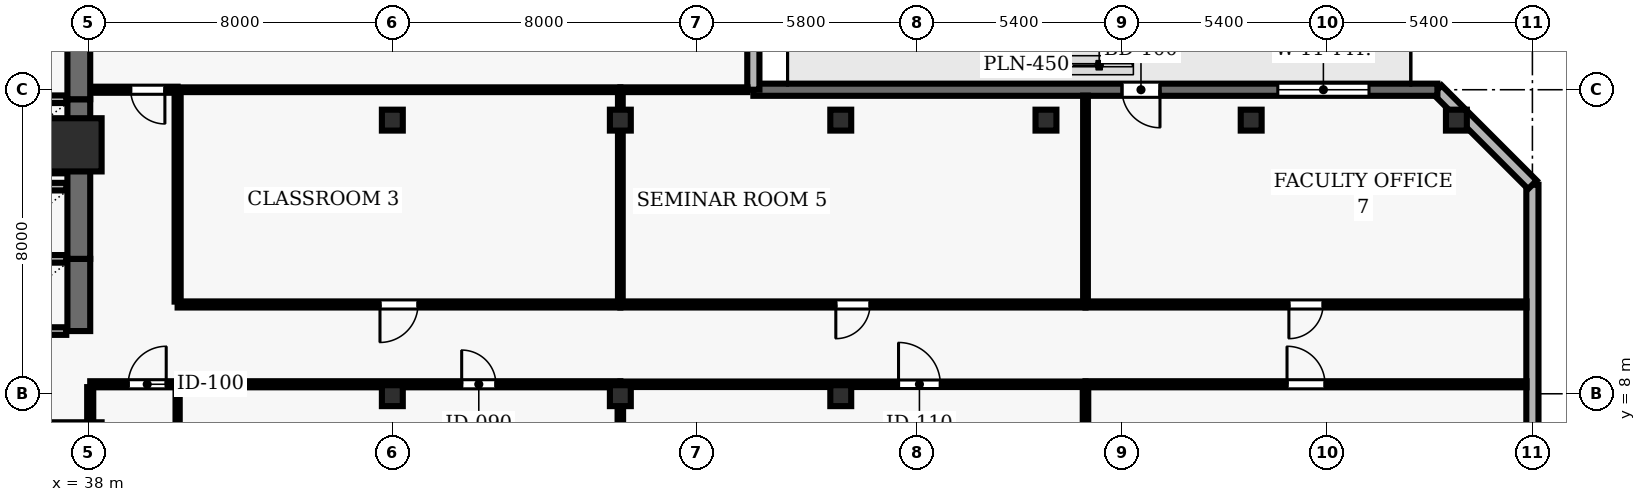
"""IFC4 building model, lengths in metres.
Left out: names, types, materials, properties, quantities, classifications, styles, units other than length and angle.
Written with IfcOpenShell. Run it as: python <this file> out.ifc"""

import sys

from ifc_helpers import new_model, si_unit, direction, frame, frame_2d, origin, origin_2d, place, context, subcontext, project, spatial, rectangle, hollow_rectangle, extrude, element, fill, save


model = new_model("IFC4")
c1 = context("Model", 3, precision=1e-05, world=origin(), true_north=direction((0.0, 1.0)))
c2 = subcontext(c1, "Body", "Model", "MODEL_VIEW")
j1 = project(units=[si_unit("LENGTHUNIT", "METRE"), si_unit("PLANEANGLEUNIT", "RADIAN")], contexts=[c1])
p1 = place(None, origin())
s1 = spatial("IfcSite", under=j1, at=p1, CompositionType="ELEMENT")
p2 = place(p1, origin())
s2 = spatial("IfcBuilding", under=s1, at=p2, CompositionType="ELEMENT")
p3 = place(p2, frame((0.0, 0.0, 31.0)))
s3 = spatial("IfcBuildingStorey", under=s2, at=p3, CompositionType="ELEMENT", Elevation=31.0)
p4 = place(p3, frame((37.65, 14.55, 0.0), z_axis=(0.0, 0.0, 1.0), x_axis=(1.0, 0.0, 0.0)))
e1 = element("IfcColumn", 1, at=p4, inside=s3, PredefinedType="COLUMN", context=c2, shape_type="SweptSolid", body=[
    extrude(rectangle(XDim=1.4, YDim=1.4, at=origin_2d()), origin(), (0.0, 0.0, 1.0), 3.9),
])
for number, where, z_axis, x_axis in (
    (2, (46.0, 7.95, 0.0), (0.0, 0.0, 1.0), (1.0, 0.0, 0.0)),
    (3, (46.0, 15.2, 0.0), (0.0, 0.0, 1.0), (1.0, 0.0, 0.0)),
    (4, (52.0, 7.95, 0.0), (0.0, 0.0, 1.0), (1.0, 0.0, 0.0)),
    (5, (52.0, 15.2, 0.0), (0.0, 0.0, 1.0), (1.0, 0.0, 0.0)),
    (6, (57.8, 7.95, 0.0), (0.0, 0.0, 1.0), (1.0, 0.0, 0.0)),
    (7, (57.8, 15.2, 0.0), (0.0, 0.0, 1.0), (1.0, 0.0, 0.0)),
    (8, (63.2, 15.2, 0.0), (0.0, 0.0, 1.0), (1.0, 0.0, 0.0)),
    (9, (68.6, 15.2, 0.0), (0.0, 0.0, 1.0), (1.0, 0.0, 0.0)),
    (10, (74.0, 15.2, 0.0), (0.0, 0.0, 1.0), (1.0, 0.0, 0.0)),
):
    element("IfcColumn", number, at=place(p3, frame(where, z_axis=z_axis, x_axis=x_axis)), inside=s3, PredefinedType="COLUMN", context=c2, shape_type="SweptSolid", body=[
        extrude(hollow_rectangle(XDim=0.55, YDim=0.55, WallThickness=0.025, at=origin_2d()), origin(), (0.0, 0.0, 1.0), 3.9),
    ])
p5 = place(p3, frame((76.0, 2.5, 0.0), z_axis=(0.0, 0.0, 1.0), x_axis=(0.0, 1.0, 0.0)))
e11 = element("IfcWall", 11, at=p5, inside=s3, PredefinedType="SOLIDWALL", context=c2, shape_type="SweptSolid", body=[
    extrude(rectangle(XDim=11.0, YDim=0.32, at=frame_2d((5.5, 0.0))), origin(), (0.0, 0.0, 1.0), 3.69),
])
p6 = place(p5, frame((1.35, 0.0, 0.9)))
e12 = element("IfcOpeningElement", 12, at=p6, cuts=e11, PredefinedType="OPENING", context=c2, shape_type="SweptSolid", body=[
    extrude(rectangle(XDim=2.8, YDim=1.8, at=frame_2d((1.4, 0.9))), frame((0.0, 0.17, 0.0), z_axis=(0.0, -1.0, 0.0), x_axis=(1.0, 0.0, 0.0)), (0.0, 0.0, 1.0), 0.34),
])
p7 = place(p3, frame((76.0, 13.5, 0.0), z_axis=(0.0, 0.0, 1.0), x_axis=(-0.707106781187, 0.707106781187, 0.0)))
e13 = element("IfcWall", 13, at=p7, inside=s3, PredefinedType="SOLIDWALL", context=c2, shape_type="SweptSolid", body=[
    extrude(rectangle(XDim=3.536, YDim=0.32, at=frame_2d((1.768, 0.0))), origin(), (0.0, 0.0, 1.0), 3.69),
])
p8 = place(p3, frame((73.5, 16.0, 0.0), z_axis=(0.0, 0.0, 1.0), x_axis=(-1.0, 0.0, 0.0)))
e14 = element("IfcWall", 14, at=p8, inside=s3, PredefinedType="SOLIDWALL", context=c2, shape_type="SweptSolid", body=[
    extrude(rectangle(XDim=18.0, YDim=0.32, at=frame_2d((9.0, 0.0))), origin(), (0.0, 0.0, 1.0), 3.69),
])
p9 = place(p8, frame((7.3, 0.0, 0.0)))
e15 = element("IfcOpeningElement", 15, at=p9, cuts=e14, PredefinedType="OPENING", context=c2, shape_type="SweptSolid", body=[
    extrude(rectangle(XDim=1.0, YDim=2.2, at=frame_2d((0.5, 1.1))), frame((0.0, 0.17, 0.0), z_axis=(0.0, -1.0, 0.0), x_axis=(1.0, 0.0, 0.0)), (0.0, 0.0, 1.0), 0.34),
])
p10 = place(p8, frame((1.8, 0.0, 0.9)))
e16 = element("IfcOpeningElement", 16, at=p10, cuts=e14, PredefinedType="OPENING", context=c2, shape_type="SweptSolid", body=[
    extrude(rectangle(XDim=2.4, YDim=2.2, at=frame_2d((1.2, 1.1))), frame((0.0, 0.17, 0.0), z_axis=(0.0, -1.0, 0.0), x_axis=(1.0, 0.0, 0.0)), (0.0, 0.0, 1.0), 0.34),
])
p11 = place(p3, frame((55.5, 16.0, 0.0), z_axis=(0.0, 0.0, 1.0), x_axis=(0.0, 1.0, 0.0)))
e17 = element("IfcWall", 17, at=p11, inside=s3, PredefinedType="SOLIDWALL", context=c2, shape_type="SweptSolid", body=[
    extrude(rectangle(XDim=11.4, YDim=0.32, at=frame_2d((5.7, 0.0))), origin(), (0.0, 0.0, 1.0), 3.69),
])
p12 = place(p11, frame((1.35, 0.0, 0.9)))
e18 = element("IfcOpeningElement", 18, at=p12, cuts=e17, PredefinedType="OPENING", context=c2, shape_type="SweptSolid", body=[
    extrude(rectangle(XDim=3.0, YDim=2.2, at=frame_2d((1.5, 1.1))), frame((0.0, 0.17, 0.0), z_axis=(0.0, -1.0, 0.0), x_axis=(1.0, 0.0, 0.0)), (0.0, 0.0, 1.0), 0.34),
])
p13 = place(p11, frame((7.05, 0.0, 0.9)))
e19 = element("IfcOpeningElement", 19, at=p13, cuts=e17, PredefinedType="OPENING", context=c2, shape_type="SweptSolid", body=[
    extrude(rectangle(XDim=3.0, YDim=2.2, at=frame_2d((1.5, 1.1))), frame((0.0, 0.17, 0.0), z_axis=(0.0, -1.0, 0.0), x_axis=(1.0, 0.0, 0.0)), (0.0, 0.0, 1.0), 0.34),
])
p14 = place(p3, frame((37.75, 9.65, 0.0), z_axis=(0.0, 0.0, 1.0), x_axis=(0.0, 1.0, 0.0)))
e20 = element("IfcWall", 20, at=p14, inside=s3, PredefinedType="SHEAR", context=c2, shape_type="SweptSolid", body=[
    extrude(rectangle(XDim=1.9, YDim=0.6, at=frame_2d((0.95, 0.0))), origin(), (0.0, 0.0, 1.0), 3.69),
])
for number, where, z_axis, x_axis in (
    (21, (35.28, 9.65, 0.0), (0.0, 0.0, 1.0), (1.0, 0.0, 0.0)),
    (22, (37.42, 11.55, 0.0), (0.0, 0.0, 1.0), (-1.0, 0.0, 0.0)),
):
    element("IfcWall", number, at=place(p3, frame(where, z_axis=z_axis, x_axis=x_axis)), inside=s3, PredefinedType="SOLIDWALL", context=c2, shape_type="SweptSolid", body=[
        extrude(rectangle(XDim=2.14, YDim=0.2, at=frame_2d((1.07, 0.0))), origin(), (0.0, 0.0, 1.0), 3.69),
    ])
p15 = place(p3, frame((37.75, 11.55, 0.0), z_axis=(0.0, 0.0, 1.0), x_axis=(0.0, 1.0, 0.0)))
e23 = element("IfcWall", 23, at=p15, inside=s3, PredefinedType="SHEAR", context=c2, shape_type="SweptSolid", body=[
    extrude(rectangle(XDim=2.35, YDim=0.6, at=frame_2d((1.175, 0.0))), origin(), (0.0, 0.0, 1.0), 3.69),
])
p16 = place(p3, frame((37.42, 13.45, 0.0), z_axis=(0.0, 0.0, 1.0), x_axis=(-1.0, 0.0, 0.0)))
e24 = element("IfcWall", 24, at=p16, inside=s3, PredefinedType="SOLIDWALL", context=c2, shape_type="SweptSolid", body=[
    extrude(rectangle(XDim=2.14, YDim=0.2, at=frame_2d((1.07, 0.0))), origin(), (0.0, 0.0, 1.0), 3.69),
])
p17 = place(p3, frame((37.75, 13.9, 0.0), z_axis=(0.0, 0.0, 1.0), x_axis=(0.0, 1.0, 0.0)))
e25 = element("IfcWall", 25, at=p17, inside=s3, PredefinedType="SHEAR", context=c2, shape_type="SweptSolid", body=[
    extrude(rectangle(XDim=1.85, YDim=0.6, at=frame_2d((0.925, 0.0))), origin(), (0.0, 0.0, 1.0), 3.69),
])
for number, where, z_axis, x_axis in (
    (26, (35.28, 13.9, 0.0), (0.0, 0.0, 1.0), (1.0, 0.0, 0.0)),
    (27, (37.42, 15.75, 0.0), (0.0, 0.0, 1.0), (-1.0, 0.0, 0.0)),
):
    element("IfcWall", number, at=place(p3, frame(where, z_axis=z_axis, x_axis=x_axis)), inside=s3, PredefinedType="SOLIDWALL", context=c2, shape_type="SweptSolid", body=[
        extrude(rectangle(XDim=2.14, YDim=0.2, at=frame_2d((1.07, 0.0))), origin(), (0.0, 0.0, 1.0), 3.69),
    ])
p18 = place(p3, frame((37.75, 15.75, 0.0), z_axis=(0.0, 0.0, 1.0), x_axis=(0.0, 1.0, 0.0)))
e28 = element("IfcWall", 28, at=p18, inside=s3, PredefinedType="SHEAR", context=c2, shape_type="SweptSolid", body=[
    extrude(rectangle(XDim=1.85, YDim=0.6, at=frame_2d((0.925, 0.0))), origin(), (0.0, 0.0, 1.0), 3.69),
])
p19 = place(p3, frame((38.05, 8.25, 0.0), z_axis=(0.0, 0.0, 1.0), x_axis=(1.0, 0.0, 0.0)))
e29 = element("IfcWall", 29, at=p19, inside=s3, PredefinedType="PARTITIONING", context=c2, shape_type="SweptSolid", body=[
    extrude(rectangle(XDim=2.3, YDim=0.16, at=frame_2d((1.15, 0.0))), origin(), (0.0, 0.0, 1.0), 2.995),
])
p20 = place(p19, frame((1.0, 0.0, 0.0)))
e30 = element("IfcOpeningElement", 30, at=p20, cuts=e29, PredefinedType="OPENING", context=c2, shape_type="SweptSolid", body=[
    extrude(rectangle(XDim=1.0, YDim=2.1, at=frame_2d((0.5, 1.05))), frame((0.0, 0.09, 0.0), z_axis=(0.0, -1.0, 0.0), x_axis=(1.0, 0.0, 0.0)), (0.0, 0.0, 1.0), 0.18),
])
p21 = place(p3, frame((40.35, 8.25, 0.0), z_axis=(0.0, 0.0, 1.0), x_axis=(1.0, 0.0, 0.0)))
e31 = element("IfcWall", 31, at=p21, inside=s3, PredefinedType="PARTITIONING", context=c2, shape_type="SweptSolid", body=[
    extrude(rectangle(XDim=11.65, YDim=0.16, at=frame_2d((5.825, 0.0))), origin(), (0.0, 0.0, 1.0), 2.995),
])
p22 = place(p21, frame((7.475, 0.0, 0.0)))
e32 = element("IfcOpeningElement", 32, at=p22, cuts=e31, PredefinedType="OPENING", context=c2, shape_type="SweptSolid", body=[
    extrude(rectangle(XDim=0.9, YDim=2.1, at=frame_2d((0.45, 1.05))), frame((0.0, 0.09, 0.0), z_axis=(0.0, -1.0, 0.0), x_axis=(1.0, 0.0, 0.0)), (0.0, 0.0, 1.0), 0.18),
])
p23 = place(p3, frame((40.35, 16.0, 0.0), z_axis=(0.0, 0.0, 1.0), x_axis=(-1.0, 0.0, 0.0)))
e33 = element("IfcWall", 33, at=p23, inside=s3, PredefinedType="PARTITIONING", context=c2, shape_type="SweptSolid", body=[
    extrude(rectangle(XDim=2.27, YDim=0.16, at=frame_2d((1.135, 0.0))), origin(), (0.0, 0.0, 1.0), 3.69),
])
p24 = place(p23, frame((0.335, 0.0, 0.0)))
e34 = element("IfcOpeningElement", 34, at=p24, cuts=e33, PredefinedType="OPENING", context=c2, shape_type="SweptSolid", body=[
    extrude(rectangle(XDim=0.9, YDim=2.1, at=frame_2d((0.45, 1.05))), frame((0.0, 0.09, 0.0), z_axis=(0.0, -1.0, 0.0), x_axis=(1.0, 0.0, 0.0)), (0.0, 0.0, 1.0), 0.18),
])
p25 = place(p3, frame((52.0, 8.25, 0.0), z_axis=(0.0, 0.0, 1.0), x_axis=(1.0, 0.0, 0.0)))
e35 = element("IfcWall", 35, at=p25, inside=s3, PredefinedType="PARTITIONING", context=c2, shape_type="SweptSolid", body=[
    extrude(rectangle(XDim=12.24, YDim=0.145, at=frame_2d((6.12, 0.0))), origin(), (0.0, 0.0, 1.0), 2.995),
])
p26 = place(p25, frame((7.32, 0.0, 0.0)))
e36 = element("IfcOpeningElement", 36, at=p26, cuts=e35, PredefinedType="OPENING", context=c2, shape_type="SweptSolid", body=[
    extrude(rectangle(XDim=1.1, YDim=2.15, at=frame_2d((0.55, 1.075))), frame((0.0, 0.083, 0.0), z_axis=(0.0, -1.0, 0.0), x_axis=(1.0, 0.0, 0.0)), (0.0, 0.0, 1.0), 0.165),
])
p27 = place(p3, frame((52.0, 10.35, 0.0), z_axis=(0.0, 0.0, 1.0), x_axis=(-1.0, 0.0, 0.0)))
e37 = element("IfcWall", 37, at=p27, inside=s3, PredefinedType="PARTITIONING", context=c2, shape_type="SweptSolid", body=[
    extrude(rectangle(XDim=11.65, YDim=0.16, at=frame_2d((5.825, 0.0))), origin(), (0.0, 0.0, 1.0), 3.227),
])
p28 = place(p27, frame((5.325, 0.0, 0.0)))
e38 = element("IfcOpeningElement", 38, at=p28, cuts=e37, PredefinedType="OPENING", context=c2, shape_type="SweptSolid", body=[
    extrude(rectangle(XDim=1.0, YDim=2.1, at=frame_2d((0.5, 1.05))), frame((0.0, 0.09, 0.0), z_axis=(0.0, -1.0, 0.0), x_axis=(1.0, 0.0, 0.0)), (0.0, 0.0, 1.0), 0.18),
])
p29 = place(p3, frame((52.0, 16.0, 0.0), z_axis=(0.0, 0.0, 1.0), x_axis=(1.0, 0.0, 0.0)))
e39 = element("IfcWall", 39, at=p29, inside=s3, PredefinedType="PARTITIONING", context=c2, shape_type="SweptSolid", body=[
    extrude(rectangle(XDim=3.345, YDim=0.125, at=frame_2d((1.672, 0.0))), origin(), (0.0, 0.0, 1.0), 3.69),
])
p30 = place(p3, frame((52.0, 16.0, 0.0), z_axis=(0.0, 0.0, 1.0), x_axis=(-1.0, 0.0, 0.0)))
e40 = element("IfcWall", 40, at=p30, inside=s3, PredefinedType="PARTITIONING", context=c2, shape_type="SweptSolid", body=[
    extrude(rectangle(XDim=11.65, YDim=0.125, at=frame_2d((5.825, 0.0))), origin(), (0.0, 0.0, 1.0), 3.69),
])
p31 = place(p3, frame((64.24, 8.25, 0.0), z_axis=(0.0, 0.0, 1.0), x_axis=(1.0, 0.0, 0.0)))
e41 = element("IfcWall", 41, at=p31, inside=s3, PredefinedType="PARTITIONING", context=c2, shape_type="SweptSolid", body=[
    extrude(rectangle(XDim=11.605, YDim=0.16, at=frame_2d((5.802, 0.0))), origin(), (0.0, 0.0, 1.0), 3.69),
])
p32 = place(p31, frame((5.303, 0.0, 0.0)))
e42 = element("IfcOpeningElement", 42, at=p32, cuts=e41, PredefinedType="OPENING", context=c2, shape_type="SweptSolid", body=[
    extrude(rectangle(XDim=1.0, YDim=2.1, at=frame_2d((0.5, 1.05))), frame((0.0, 0.09, 0.0), z_axis=(0.0, -1.0, 0.0), x_axis=(1.0, 0.0, 0.0)), (0.0, 0.0, 1.0), 0.18),
])
p33 = place(p3, frame((64.24, 10.35, 0.0), z_axis=(0.0, 0.0, 1.0), x_axis=(-1.0, 0.0, 0.0)))
e43 = element("IfcWall", 43, at=p33, inside=s3, PredefinedType="PARTITIONING", context=c2, shape_type="SweptSolid", body=[
    extrude(rectangle(XDim=12.24, YDim=0.16, at=frame_2d((6.12, 0.0))), origin(), (0.0, 0.0, 1.0), 3.227),
])
p34 = place(p33, frame((5.67, 0.0, 0.0)))
e44 = element("IfcOpeningElement", 44, at=p34, cuts=e43, PredefinedType="OPENING", context=c2, shape_type="SweptSolid", body=[
    extrude(rectangle(XDim=0.9, YDim=2.1, at=frame_2d((0.45, 1.05))), frame((0.0, 0.09, 0.0), z_axis=(0.0, -1.0, 0.0), x_axis=(1.0, 0.0, 0.0)), (0.0, 0.0, 1.0), 0.18),
])
p35 = place(p3, frame((75.845, 10.35, 0.0), z_axis=(0.0, 0.0, 1.0), x_axis=(-1.0, 0.0, 0.0)))
e45 = element("IfcWall", 45, at=p35, inside=s3, PredefinedType="PARTITIONING", context=c2, shape_type="SweptSolid", body=[
    extrude(rectangle(XDim=11.605, YDim=0.16, at=frame_2d((5.802, 0.0))), origin(), (0.0, 0.0, 1.0), 3.227),
])
p36 = place(p35, frame((5.353, 0.0, 0.0)))
e46 = element("IfcOpeningElement", 46, at=p36, cuts=e45, PredefinedType="OPENING", context=c2, shape_type="SweptSolid", body=[
    extrude(rectangle(XDim=0.9, YDim=2.1, at=frame_2d((0.45, 1.05))), frame((0.0, 0.09, 0.0), z_axis=(0.0, -1.0, 0.0), x_axis=(1.0, 0.0, 0.0)), (0.0, 0.0, 1.0), 0.18),
])
p37 = place(p3, frame((38.05, 7.05, 0.0), z_axis=(0.0, 0.0, 1.0), x_axis=(0.0, 1.0, 0.0)))
e47 = element("IfcWall", 47, at=p37, inside=s3, PredefinedType="PARTITIONING", context=c2, shape_type="SweptSolid", body=[
    extrude(rectangle(XDim=1.125, YDim=0.16, at=frame_2d((0.562, 0.0))), origin(), (0.0, 0.0, 1.0), 2.995),
])
p38 = place(p3, frame((40.35, 0.155, 0.0), z_axis=(0.0, 0.0, 1.0), x_axis=(0.0, 1.0, 0.0)))
e48 = element("IfcWall", 48, at=p38, inside=s3, PredefinedType="MOVABLE", context=c2, shape_type="SweptSolid", body=[
    extrude(rectangle(XDim=8.02, YDim=0.11, at=frame_2d((4.01, 0.0))), origin(), (0.0, 0.0, 1.0), 3.69),
])
p39 = place(p3, frame((40.35, 10.425, 0.0), z_axis=(0.0, 0.0, 1.0), x_axis=(0.0, 1.0, 0.0)))
e49 = element("IfcWall", 49, at=p39, inside=s3, PredefinedType="PARTITIONING", context=c2, shape_type="SweptSolid", body=[
    extrude(rectangle(XDim=5.5, YDim=0.16, at=frame_2d((2.75, 0.0))), origin(), (0.0, 0.0, 1.0), 3.227),
])
p40 = place(p3, frame((52.0, 0.155, 0.0), z_axis=(0.0, 0.0, 1.0), x_axis=(0.0, 1.0, 0.0)))
e50 = element("IfcWall", 50, at=p40, inside=s3, PredefinedType="PARTITIONING", context=c2, shape_type="SweptSolid", body=[
    extrude(rectangle(XDim=8.02, YDim=0.145, at=frame_2d((4.01, 0.0))), origin(), (0.0, 0.0, 1.0), 2.995),
])
p41 = place(p3, frame((52.0, 10.425, 0.0), z_axis=(0.0, 0.0, 1.0), x_axis=(0.0, 1.0, 0.0)))
e51 = element("IfcWall", 51, at=p41, inside=s3, PredefinedType="PARTITIONING", context=c2, shape_type="SweptSolid", body=[
    extrude(rectangle(XDim=5.518, YDim=0.125, at=frame_2d((2.759, 0.0))), origin(), (0.0, 0.0, 1.0), 2.995),
])
p42 = place(p3, frame((64.24, 0.155, 0.0), z_axis=(0.0, 0.0, 1.0), x_axis=(0.0, 1.0, 0.0)))
e52 = element("IfcWall", 52, at=p42, inside=s3, PredefinedType="PARTITIONING", context=c2, shape_type="SweptSolid", body=[
    extrude(rectangle(XDim=8.02, YDim=0.145, at=frame_2d((4.01, 0.0))), origin(), (0.0, 0.0, 1.0), 3.69),
])
p43 = place(p3, frame((64.24, 10.425, 0.0), z_axis=(0.0, 0.0, 1.0), x_axis=(0.0, 1.0, 0.0)))
e53 = element("IfcWall", 53, at=p43, inside=s3, PredefinedType="PARTITIONING", context=c2, shape_type="SweptSolid", body=[
    extrude(rectangle(XDim=5.42, YDim=0.125, at=frame_2d((2.71, 0.0))), origin(), (0.0, 0.0, 1.0), 3.69),
])
p44 = place(p9, origin())
e54 = element("IfcDoor", 54, at=p44, inside=s3, OperationType="SINGLE_SWING_LEFT", PredefinedType="DOOR", context=c2, shape_type="SweptSolid", body=[
    extrude(rectangle(XDim=1.0, YDim=2.2, at=frame_2d((0.5, 1.1))), frame((0.0, 0.025, 0.0), z_axis=(0.0, -1.0, 0.0), x_axis=(1.0, 0.0, 0.0)), (0.0, 0.0, 1.0), 0.05),
])
fill(e15, e54)
p45 = place(p10, origin())
e55 = element("IfcWindow", 55, at=p45, inside=s3, PartitioningType="SINGLE_PANEL", PredefinedType="WINDOW", context=c2, shape_type="SweptSolid", body=[
    extrude(rectangle(XDim=2.4, YDim=2.2, at=frame_2d((1.2, 1.1))), frame((0.0, 0.03, 0.0), z_axis=(0.0, -1.0, 0.0), x_axis=(1.0, 0.0, 0.0)), (0.0, 0.0, 1.0), 0.06),
])
fill(e16, e55)
p46 = place(p20, origin())
e56 = element("IfcDoor", 56, at=p46, inside=s3, OperationType="SINGLE_SWING_RIGHT", PredefinedType="DOOR", context=c2, shape_type="SweptSolid", body=[
    extrude(rectangle(XDim=1.0, YDim=2.1, at=frame_2d((0.5, 1.05))), frame((0.0, 0.025, 0.0), z_axis=(0.0, -1.0, 0.0), x_axis=(1.0, 0.0, 0.0)), (0.0, 0.0, 1.0), 0.05),
])
fill(e30, e56)
p47 = place(p22, origin())
e57 = element("IfcDoor", 57, at=p47, inside=s3, OperationType="SINGLE_SWING_LEFT", PredefinedType="DOOR", context=c2, shape_type="SweptSolid", body=[
    extrude(rectangle(XDim=0.9, YDim=2.1, at=frame_2d((0.45, 1.05))), frame((0.0, 0.025, 0.0), z_axis=(0.0, -1.0, 0.0), x_axis=(1.0, 0.0, 0.0)), (0.0, 0.0, 1.0), 0.05),
])
fill(e32, e57)
p48 = place(p28, origin())
e58 = element("IfcDoor", 58, at=p48, inside=s3, OperationType="SINGLE_SWING_RIGHT", PredefinedType="DOOR", context=c2, shape_type="SweptSolid", body=[
    extrude(rectangle(XDim=1.0, YDim=2.1, at=frame_2d((0.5, 1.05))), frame((0.0, 0.025, 0.0), z_axis=(0.0, -1.0, 0.0), x_axis=(1.0, 0.0, 0.0)), (0.0, 0.0, 1.0), 0.05),
])
fill(e38, e58)
p49 = place(p26, origin())
e59 = element("IfcDoor", 59, at=p49, inside=s3, OperationType="SINGLE_SWING_LEFT", PredefinedType="DOOR", context=c2, shape_type="SweptSolid", body=[
    extrude(rectangle(XDim=1.1, YDim=2.15, at=frame_2d((0.55, 1.075))), frame((0.0, 0.025, 0.0), z_axis=(0.0, -1.0, 0.0), x_axis=(1.0, 0.0, 0.0)), (0.0, 0.0, 1.0), 0.05),
])
fill(e36, e59)
p50 = place(p34, origin())
e60 = element("IfcDoor", 60, at=p50, inside=s3, OperationType="SINGLE_SWING_RIGHT", PredefinedType="DOOR", context=c2, shape_type="SweptSolid", body=[
    extrude(rectangle(XDim=0.9, YDim=2.1, at=frame_2d((0.45, 1.05))), frame((0.0, 0.025, 0.0), z_axis=(0.0, -1.0, 0.0), x_axis=(1.0, 0.0, 0.0)), (0.0, 0.0, 1.0), 0.05),
])
fill(e44, e60)
p51 = place(p32, origin())
e61 = element("IfcDoor", 61, at=p51, inside=s3, OperationType="SINGLE_SWING_LEFT", PredefinedType="DOOR", context=c2, shape_type="SweptSolid", body=[
    extrude(rectangle(XDim=1.0, YDim=2.1, at=frame_2d((0.5, 1.05))), frame((0.0, 0.025, 0.0), z_axis=(0.0, -1.0, 0.0), x_axis=(1.0, 0.0, 0.0)), (0.0, 0.0, 1.0), 0.05),
])
fill(e42, e61)
p52 = place(p36, origin())
e62 = element("IfcDoor", 62, at=p52, inside=s3, OperationType="SINGLE_SWING_RIGHT", PredefinedType="DOOR", context=c2, shape_type="SweptSolid", body=[
    extrude(rectangle(XDim=0.9, YDim=2.1, at=frame_2d((0.45, 1.05))), frame((0.0, 0.025, 0.0), z_axis=(0.0, -1.0, 0.0), x_axis=(1.0, 0.0, 0.0)), (0.0, 0.0, 1.0), 0.05),
])
fill(e46, e62)
p53 = place(p24, origin())
e63 = element("IfcDoor", 63, at=p53, inside=s3, OperationType="SINGLE_SWING_LEFT", PredefinedType="DOOR", context=c2, shape_type="SweptSolid", body=[
    extrude(rectangle(XDim=0.9, YDim=2.1, at=frame_2d((0.45, 1.05))), frame((0.0, 0.025, 0.0), z_axis=(0.0, -1.0, 0.0), x_axis=(1.0, 0.0, 0.0)), (0.0, 0.0, 1.0), 0.05),
])
fill(e34, e63)
save(model, sys.argv[1])
